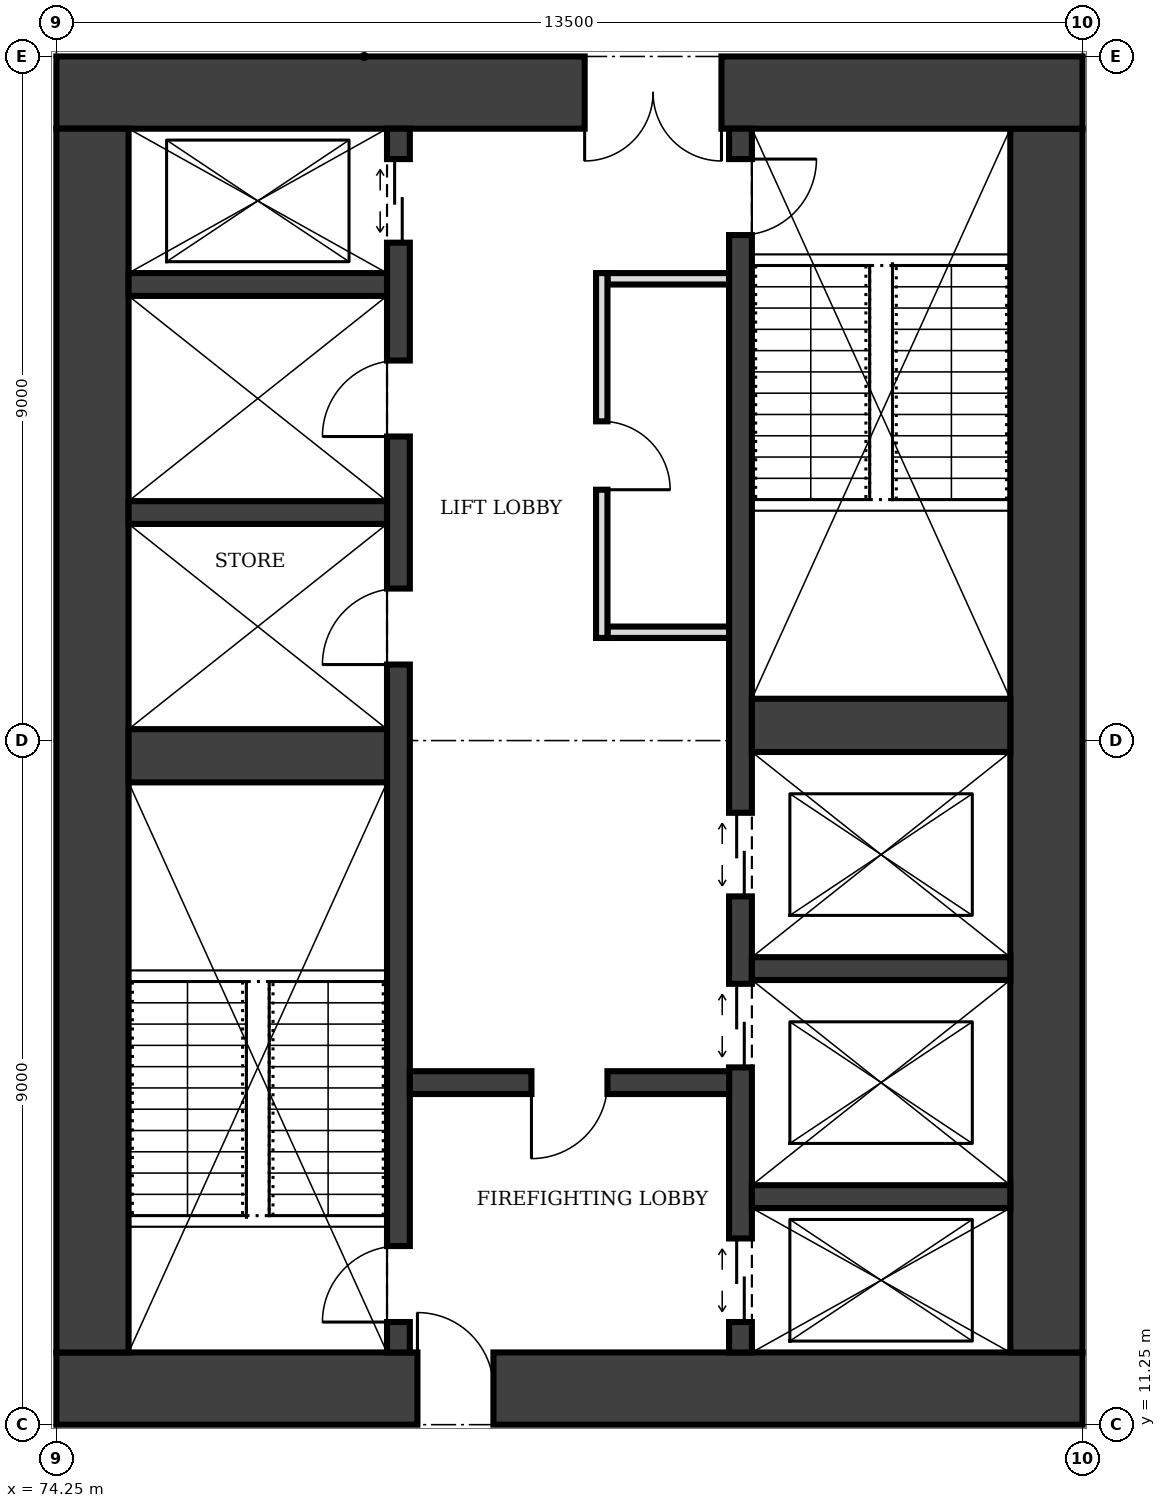
"""IFC4 building model, lengths in metres.
Left out: names, types, materials, properties, quantities, classifications, styles, units other than length and angle.
Written with IfcOpenShell. Run it as: python <this file> out.ifc"""

import sys

from ifc_helpers import new_model, si_unit, direction, frame, frame_2d, origin, place, context, subcontext, project, spatial, rectangle, extrude, element, fill, save


model = new_model("IFC4")
c1 = context("Model", 3, precision=1e-05, world=origin(), true_north=direction((0.0, 1.0)))
c2 = subcontext(c1, "Body", "Model", "MODEL_VIEW")
j1 = project(units=[si_unit("LENGTHUNIT", "METRE"), si_unit("PLANEANGLEUNIT", "RADIAN")], contexts=[c1])
p1 = place(None, origin())
s1 = spatial("IfcSite", under=j1, at=p1, CompositionType="ELEMENT")
p2 = place(p1, origin())
s2 = spatial("IfcBuilding", under=s1, at=p2, CompositionType="ELEMENT")
p3 = place(p2, frame((0.0, 0.0, 117.0)))
s3 = spatial("IfcBuildingStorey", under=s2, at=p3, CompositionType="ELEMENT", Elevation=117.0)
p4 = place(p3, frame((74.25, 11.725, 0.0), z_axis=(0.0, 0.0, 1.0), x_axis=(1.0, 0.0, 0.0)))
e1 = element("IfcWall", 1, at=p4, inside=s3, PredefinedType="SHEAR", context=c2, shape_type="SweptSolid", body=[
    extrude(rectangle(XDim=13.5, YDim=0.95, at=frame_2d((6.75, 0.0))), origin(), (0.0, 0.0, 1.0), 4.0),
])
p5 = place(p4, frame((4.75, 0.0, 0.0)))
e2 = element("IfcOpeningElement", 2, at=p5, cuts=e1, PredefinedType="OPENING", context=c2, shape_type="SweptSolid", body=[
    extrude(rectangle(XDim=1.0, YDim=2.1, at=frame_2d((0.5, 1.05))), frame((0.0, 0.485, 0.0), z_axis=(0.0, -1.0, 0.0), x_axis=(1.0, 0.0, 0.0)), (0.0, 0.0, 1.0), 0.97),
])
p6 = place(p3, frame((87.275, 12.2, 0.0), z_axis=(0.0, 0.0, 1.0), x_axis=(0.0, 1.0, 0.0)))
e3 = element("IfcWall", 3, at=p6, inside=s3, PredefinedType="SHEAR", context=c2, shape_type="SweptSolid", body=[
    extrude(rectangle(XDim=16.1, YDim=0.95, at=frame_2d((8.05, 0.0))), origin(), (0.0, 0.0, 1.0), 4.0),
])
p7 = place(p3, frame((87.75, 28.775, 0.0), z_axis=(0.0, 0.0, 1.0), x_axis=(-1.0, 0.0, 0.0)))
e4 = element("IfcWall", 4, at=p7, inside=s3, PredefinedType="SHEAR", context=c2, shape_type="SweptSolid", body=[
    extrude(rectangle(XDim=13.5, YDim=0.95, at=frame_2d((6.75, 0.0))), origin(), (0.0, 0.0, 1.0), 4.0),
])
p8 = place(p7, frame((4.75, 0.0, 0.0)))
e5 = element("IfcOpeningElement", 5, at=p8, cuts=e4, PredefinedType="OPENING", context=c2, shape_type="SweptSolid", body=[
    extrude(rectangle(XDim=1.8, YDim=2.1, at=frame_2d((0.9, 1.05))), frame((0.0, 0.485, 0.0), z_axis=(0.0, -1.0, 0.0), x_axis=(1.0, 0.0, 0.0)), (0.0, 0.0, 1.0), 0.97),
])
p9 = place(p3, frame((74.725, 28.3, 0.0), z_axis=(0.0, 0.0, 1.0), x_axis=(0.0, -1.0, 0.0)))
e6 = element("IfcWall", 6, at=p9, inside=s3, PredefinedType="SHEAR", context=c2, shape_type="SweptSolid", body=[
    extrude(rectangle(XDim=16.1, YDim=0.95, at=frame_2d((8.05, 0.0))), origin(), (0.0, 0.0, 1.0), 4.0),
])
p10 = place(p3, frame((78.75, 12.2, 0.0), z_axis=(0.0, 0.0, 1.0), x_axis=(0.0, 1.0, 0.0)))
e7 = element("IfcWall", 7, at=p10, inside=s3, PredefinedType="SHEAR", context=c2, shape_type="SweptSolid", body=[
    extrude(rectangle(XDim=16.1, YDim=0.3, at=frame_2d((8.05, 0.0))), origin(), (0.0, 0.0, 1.0), 4.0),
])
p11 = place(p10, frame((0.4, 0.0, 0.0)))
e8 = element("IfcOpeningElement", 8, at=p11, cuts=e7, PredefinedType="OPENING", context=c2, shape_type="SweptSolid", body=[
    extrude(rectangle(XDim=1.0, YDim=2.1, at=frame_2d((0.5, 1.05))), frame((0.0, 0.16, 0.0), z_axis=(0.0, -1.0, 0.0), x_axis=(1.0, 0.0, 0.0)), (0.0, 0.0, 1.0), 0.32),
])
p12 = place(p10, frame((14.6, 0.0, 0.0)))
e9 = element("IfcOpeningElement", 9, at=p12, cuts=e7, PredefinedType="OPENING", context=c2, shape_type="SweptSolid", body=[
    extrude(rectangle(XDim=1.1, YDim=2.1, at=frame_2d((0.55, 1.05))), frame((0.0, 0.16, 0.0), z_axis=(0.0, -1.0, 0.0), x_axis=(1.0, 0.0, 0.0)), (0.0, 0.0, 1.0), 0.32),
])
p13 = place(p10, frame((9.05, 0.0, 0.0)))
e10 = element("IfcOpeningElement", 10, at=p13, cuts=e7, PredefinedType="OPENING", context=c2, shape_type="SweptSolid", body=[
    extrude(rectangle(XDim=1.0, YDim=2.1, at=frame_2d((0.5, 1.05))), frame((0.0, 0.16, 0.0), z_axis=(0.0, -1.0, 0.0), x_axis=(1.0, 0.0, 0.0)), (0.0, 0.0, 1.0), 0.32),
])
p14 = place(p10, frame((12.05, 0.0, 0.0)))
e11 = element("IfcOpeningElement", 11, at=p14, cuts=e7, PredefinedType="OPENING", context=c2, shape_type="SweptSolid", body=[
    extrude(rectangle(XDim=1.0, YDim=2.1, at=frame_2d((0.5, 1.05))), frame((0.0, 0.16, 0.0), z_axis=(0.0, -1.0, 0.0), x_axis=(1.0, 0.0, 0.0)), (0.0, 0.0, 1.0), 0.32),
])
p15 = place(p3, frame((83.25, 12.2, 0.0), z_axis=(0.0, 0.0, 1.0), x_axis=(0.0, 1.0, 0.0)))
e12 = element("IfcWall", 12, at=p15, inside=s3, PredefinedType="SHEAR", context=c2, shape_type="SweptSolid", body=[
    extrude(rectangle(XDim=16.1, YDim=0.3, at=frame_2d((8.05, 0.0))), origin(), (0.0, 0.0, 1.0), 4.0),
])
p16 = place(p15, frame((14.7, 0.0, 0.0)))
e13 = element("IfcOpeningElement", 13, at=p16, cuts=e12, PredefinedType="OPENING", context=c2, shape_type="SweptSolid", body=[
    extrude(rectangle(XDim=1.0, YDim=2.1, at=frame_2d((0.5, 1.05))), frame((0.0, 0.16, 0.0), z_axis=(0.0, -1.0, 0.0), x_axis=(1.0, 0.0, 0.0)), (0.0, 0.0, 1.0), 0.32),
])
p17 = place(p15, frame((0.4, 0.0, 0.0)))
e14 = element("IfcOpeningElement", 14, at=p17, cuts=e12, PredefinedType="OPENING", context=c2, shape_type="SweptSolid", body=[
    extrude(rectangle(XDim=1.1, YDim=2.1, at=frame_2d((0.55, 1.05))), frame((0.0, 0.16, 0.0), z_axis=(0.0, -1.0, 0.0), x_axis=(1.0, 0.0, 0.0)), (0.0, 0.0, 1.0), 0.32),
])
p18 = place(p15, frame((3.75, 0.0, 0.0)))
e15 = element("IfcOpeningElement", 15, at=p18, cuts=e12, PredefinedType="OPENING", context=c2, shape_type="SweptSolid", body=[
    extrude(rectangle(XDim=1.1, YDim=2.1, at=frame_2d((0.55, 1.05))), frame((0.0, 0.16, 0.0), z_axis=(0.0, -1.0, 0.0), x_axis=(1.0, 0.0, 0.0)), (0.0, 0.0, 1.0), 0.32),
])
p19 = place(p15, frame((6.0, 0.0, 0.0)))
e16 = element("IfcOpeningElement", 16, at=p19, cuts=e12, PredefinedType="OPENING", context=c2, shape_type="SweptSolid", body=[
    extrude(rectangle(XDim=1.1, YDim=2.1, at=frame_2d((0.55, 1.05))), frame((0.0, 0.16, 0.0), z_axis=(0.0, -1.0, 0.0), x_axis=(1.0, 0.0, 0.0)), (0.0, 0.0, 1.0), 0.32),
])
p20 = place(p3, frame((75.2, 20.05, 0.0), z_axis=(0.0, 0.0, 1.0), x_axis=(1.0, 0.0, 0.0)))
e17 = element("IfcWall", 17, at=p20, inside=s3, PredefinedType="SHEAR", context=c2, shape_type="SweptSolid", body=[
    extrude(rectangle(XDim=3.4, YDim=0.7, at=frame_2d((1.7, 0.0))), origin(), (0.0, 0.0, 1.0), 4.0),
])
p21 = place(p3, frame((78.9, 15.75, 0.0), z_axis=(0.0, 0.0, 1.0), x_axis=(1.0, 0.0, 0.0)))
e18 = element("IfcWall", 18, at=p21, inside=s3, PredefinedType="SHEAR", context=c2, shape_type="SweptSolid", body=[
    extrude(rectangle(XDim=4.2, YDim=0.3, at=frame_2d((2.1, 0.0))), origin(), (0.0, 0.0, 1.0), 4.0),
])
p22 = place(p21, frame((1.6, 0.0, 0.0)))
e19 = element("IfcOpeningElement", 19, at=p22, cuts=e18, PredefinedType="OPENING", context=c2, shape_type="SweptSolid", body=[
    extrude(rectangle(XDim=1.0, YDim=2.1, at=frame_2d((0.5, 1.05))), frame((0.0, 0.16, 0.0), z_axis=(0.0, -1.0, 0.0), x_axis=(1.0, 0.0, 0.0)), (0.0, 0.0, 1.0), 0.32),
])
for number, where, z_axis, x_axis in (
    (20, (83.4, 14.25, 0.0), (0.0, 0.0, 1.0), (1.0, 0.0, 0.0)),
    (21, (83.4, 17.25, 0.0), (0.0, 0.0, 1.0), (1.0, 0.0, 0.0)),
):
    element("IfcWall", number, at=place(p3, frame(where, z_axis=z_axis, x_axis=x_axis)), inside=s3, PredefinedType="SHEAR", context=c2, shape_type="SweptSolid", body=[
        extrude(rectangle(XDim=3.4, YDim=0.3, at=frame_2d((1.7, 0.0))), origin(), (0.0, 0.0, 1.0), 4.0),
    ])
p23 = place(p3, frame((83.4, 20.45, 0.0), z_axis=(0.0, 0.0, 1.0), x_axis=(1.0, 0.0, 0.0)))
e22 = element("IfcWall", 22, at=p23, inside=s3, PredefinedType="SHEAR", context=c2, shape_type="SweptSolid", body=[
    extrude(rectangle(XDim=3.4, YDim=0.7, at=frame_2d((1.7, 0.0))), origin(), (0.0, 0.0, 1.0), 4.0),
])
for number, where, z_axis, x_axis in (
    (23, (75.2, 23.25, 0.0), (0.0, 0.0, 1.0), (1.0, 0.0, 0.0)),
    (24, (75.2, 26.25, 0.0), (0.0, 0.0, 1.0), (1.0, 0.0, 0.0)),
):
    element("IfcWall", number, at=place(p3, frame(where, z_axis=z_axis, x_axis=x_axis)), inside=s3, PredefinedType="SHEAR", context=c2, shape_type="SweptSolid", body=[
        extrude(rectangle(XDim=3.4, YDim=0.3, at=frame_2d((1.7, 0.0))), origin(), (0.0, 0.0, 1.0), 4.0),
    ])
p24 = place(p3, frame((81.425, 21.6, 0.0), z_axis=(0.0, 0.0, 1.0), x_axis=(0.0, 1.0, 0.0)))
e25 = element("IfcWall", 25, at=p24, inside=s3, PredefinedType="PARTITIONING", context=c2, shape_type="SweptSolid", body=[
    extrude(rectangle(XDim=4.8, YDim=0.15, at=frame_2d((2.4, 0.0))), origin(), (0.0, 0.0, 1.0), 3.75),
])
p25 = place(p24, frame((1.95, 0.0, 0.0)))
e26 = element("IfcOpeningElement", 26, at=p25, cuts=e25, PredefinedType="OPENING", context=c2, shape_type="SweptSolid", body=[
    extrude(rectangle(XDim=0.9, YDim=2.1, at=frame_2d((0.45, 1.05))), frame((0.0, 0.085, 0.0), z_axis=(0.0, -1.0, 0.0), x_axis=(1.0, 0.0, 0.0)), (0.0, 0.0, 1.0), 0.17),
])
for number, where, z_axis, x_axis in (
    (27, (81.5, 21.675, 0.0), (0.0, 0.0, 1.0), (1.0, 0.0, 0.0)),
    (28, (81.5, 26.325, 0.0), (0.0, 0.0, 1.0), (1.0, 0.0, 0.0)),
):
    element("IfcWall", number, at=place(p3, frame(where, z_axis=z_axis, x_axis=x_axis)), inside=s3, PredefinedType="PARTITIONING", context=c2, shape_type="SweptSolid", body=[
        extrude(rectangle(XDim=1.6, YDim=0.15, at=frame_2d((0.8, 0.0))), origin(), (0.0, 0.0, 1.0), 3.75),
    ])
p26 = place(p5, origin())
e29 = element("IfcDoor", 29, at=p26, inside=s3, OperationType="SINGLE_SWING_LEFT", PredefinedType="DOOR", context=c2, shape_type="SweptSolid", body=[
    extrude(rectangle(XDim=1.0, YDim=2.1, at=frame_2d((0.5, 1.05))), frame((0.0, 0.025, 0.0), z_axis=(0.0, -1.0, 0.0), x_axis=(1.0, 0.0, 0.0)), (0.0, 0.0, 1.0), 0.05),
])
fill(e2, e29)
p27 = place(p8, origin())
e30 = element("IfcDoor", 30, at=p27, inside=s3, OperationType="DOUBLE_DOOR_SINGLE_SWING", PredefinedType="DOOR", context=c2, shape_type="SweptSolid", body=[
    extrude(rectangle(XDim=1.8, YDim=2.1, at=frame_2d((0.9, 1.05))), frame((0.0, 0.025, 0.0), z_axis=(0.0, -1.0, 0.0), x_axis=(1.0, 0.0, 0.0)), (0.0, 0.0, 1.0), 0.05),
])
fill(e5, e30)
p28 = place(p22, frame((1.0, 0.0, 0.0), z_axis=(0.0, 0.0, 1.0), x_axis=(-1.0, 0.0, 0.0)))
e31 = element("IfcDoor", 31, at=p28, inside=s3, OperationType="SINGLE_SWING_RIGHT", PredefinedType="DOOR", context=c2, shape_type="SweptSolid", body=[
    extrude(rectangle(XDim=1.0, YDim=2.1, at=frame_2d((0.5, 1.05))), frame((0.0, 0.025, 0.0), z_axis=(0.0, -1.0, 0.0), x_axis=(1.0, 0.0, 0.0)), (0.0, 0.0, 1.0), 0.05),
])
fill(e19, e31)
p29 = place(p11, origin())
e32 = element("IfcDoor", 32, at=p29, inside=s3, OperationType="SINGLE_SWING_LEFT", PredefinedType="DOOR", context=c2, shape_type="SweptSolid", body=[
    extrude(rectangle(XDim=1.0, YDim=2.1, at=frame_2d((0.5, 1.05))), frame((0.0, 0.025, 0.0), z_axis=(0.0, -1.0, 0.0), x_axis=(1.0, 0.0, 0.0)), (0.0, 0.0, 1.0), 0.05),
])
fill(e8, e32)
p30 = place(p16, frame((1.0, 0.0, 0.0), z_axis=(0.0, 0.0, 1.0), x_axis=(-1.0, 0.0, 0.0)))
e33 = element("IfcDoor", 33, at=p30, inside=s3, OperationType="SINGLE_SWING_LEFT", PredefinedType="DOOR", context=c2, shape_type="SweptSolid", body=[
    extrude(rectangle(XDim=1.0, YDim=2.1, at=frame_2d((0.5, 1.05))), frame((0.0, 0.025, 0.0), z_axis=(0.0, -1.0, 0.0), x_axis=(1.0, 0.0, 0.0)), (0.0, 0.0, 1.0), 0.05),
])
fill(e13, e33)
p31 = place(p17, origin())
e34 = element("IfcDoor", 34, at=p31, inside=s3, OperationType="DOUBLE_DOOR_SLIDING", PredefinedType="DOOR", context=c2, shape_type="SweptSolid", body=[
    extrude(rectangle(XDim=1.1, YDim=2.1, at=frame_2d((0.55, 1.05))), frame((0.0, 0.025, 0.0), z_axis=(0.0, -1.0, 0.0), x_axis=(1.0, 0.0, 0.0)), (0.0, 0.0, 1.0), 0.05),
])
fill(e14, e34)
p32 = place(p12, origin())
e35 = element("IfcDoor", 35, at=p32, inside=s3, OperationType="DOUBLE_DOOR_SLIDING", PredefinedType="DOOR", context=c2, shape_type="SweptSolid", body=[
    extrude(rectangle(XDim=1.1, YDim=2.1, at=frame_2d((0.55, 1.05))), frame((0.0, 0.025, 0.0), z_axis=(0.0, -1.0, 0.0), x_axis=(1.0, 0.0, 0.0)), (0.0, 0.0, 1.0), 0.05),
])
fill(e9, e35)
p33 = place(p18, origin())
e36 = element("IfcDoor", 36, at=p33, inside=s3, OperationType="DOUBLE_DOOR_SLIDING", PredefinedType="DOOR", context=c2, shape_type="SweptSolid", body=[
    extrude(rectangle(XDim=1.1, YDim=2.1, at=frame_2d((0.55, 1.05))), frame((0.0, 0.025, 0.0), z_axis=(0.0, -1.0, 0.0), x_axis=(1.0, 0.0, 0.0)), (0.0, 0.0, 1.0), 0.05),
])
fill(e15, e36)
p34 = place(p19, origin())
e37 = element("IfcDoor", 37, at=p34, inside=s3, OperationType="DOUBLE_DOOR_SLIDING", PredefinedType="DOOR", context=c2, shape_type="SweptSolid", body=[
    extrude(rectangle(XDim=1.1, YDim=2.1, at=frame_2d((0.55, 1.05))), frame((0.0, 0.025, 0.0), z_axis=(0.0, -1.0, 0.0), x_axis=(1.0, 0.0, 0.0)), (0.0, 0.0, 1.0), 0.05),
])
fill(e16, e37)
p35 = place(p25, frame((0.9, 0.0, 0.0), z_axis=(0.0, 0.0, 1.0), x_axis=(-1.0, 0.0, 0.0)))
e38 = element("IfcDoor", 38, at=p35, inside=s3, OperationType="SINGLE_SWING_RIGHT", PredefinedType="DOOR", context=c2, shape_type="SweptSolid", body=[
    extrude(rectangle(XDim=0.9, YDim=2.1, at=frame_2d((0.45, 1.05))), frame((0.0, 0.025, 0.0), z_axis=(0.0, -1.0, 0.0), x_axis=(1.0, 0.0, 0.0)), (0.0, 0.0, 1.0), 0.05),
])
fill(e26, e38)
p36 = place(p13, origin())
e39 = element("IfcDoor", 39, at=p36, inside=s3, OperationType="SINGLE_SWING_LEFT", PredefinedType="DOOR", context=c2, shape_type="SweptSolid", body=[
    extrude(rectangle(XDim=1.0, YDim=2.1, at=frame_2d((0.5, 1.05))), frame((0.0, 0.025, 0.0), z_axis=(0.0, -1.0, 0.0), x_axis=(1.0, 0.0, 0.0)), (0.0, 0.0, 1.0), 0.05),
])
fill(e10, e39)
p37 = place(p14, origin())
e40 = element("IfcDoor", 40, at=p37, inside=s3, OperationType="SINGLE_SWING_LEFT", PredefinedType="DOOR", context=c2, shape_type="SweptSolid", body=[
    extrude(rectangle(XDim=1.0, YDim=2.1, at=frame_2d((0.5, 1.05))), frame((0.0, 0.025, 0.0), z_axis=(0.0, -1.0, 0.0), x_axis=(1.0, 0.0, 0.0)), (0.0, 0.0, 1.0), 0.05),
])
fill(e11, e40)
save(model, sys.argv[1])
